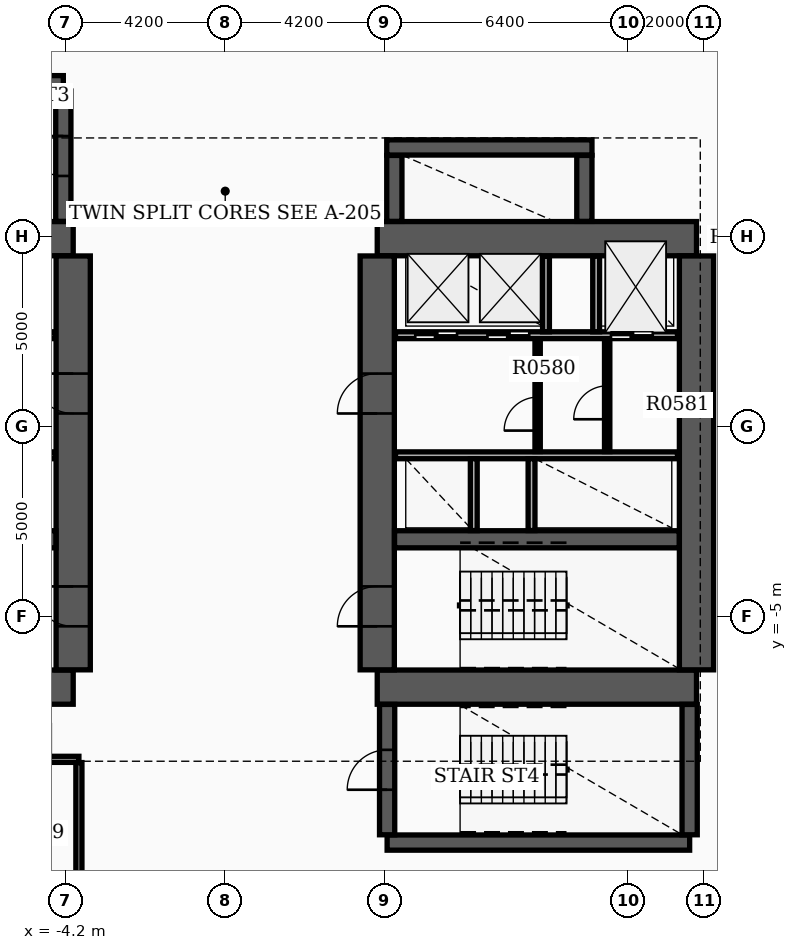
"""IFC4 building model, lengths in metres.
Left out: names, types, materials, properties, quantities, classifications, styles, units other than length and angle.
Written with IfcOpenShell. Run it as: python <this file> out.ifc"""

import sys

from ifc_helpers import new_model, si_unit, direction, frame, frame_2d, origin, place, context, subcontext, project, spatial, rectangle, extrude, element, fill, save


model = new_model("IFC4")
c1 = context("Model", 3, precision=1e-05, world=origin(), true_north=direction((0.0, 1.0)))
c2 = subcontext(c1, "Body", "Model", "MODEL_VIEW")
j1 = project(units=[si_unit("LENGTHUNIT", "METRE"), si_unit("PLANEANGLEUNIT", "RADIAN")], contexts=[c1])
p1 = place(None, origin())
s1 = spatial("IfcSite", under=j1, at=p1, CompositionType="ELEMENT")
p2 = place(p1, origin())
s2 = spatial("IfcBuilding", under=s1, at=p2, CompositionType="ELEMENT")
p3 = place(p2, frame((0.0, 0.0, 39.3)))
s3 = spatial("IfcBuildingStorey", under=s2, at=p3, CompositionType="ELEMENT", Elevation=39.3)
for number, where, z_axis, x_axis in (
    (1, (-12.4, -6.85, 0.0), (0.0, 0.0, 1.0), (1.0, 0.0, 0.0)),
    (2, (-12.4, 4.95, 0.0), (0.0, 0.0, 1.0), (1.0, 0.0, 0.0)),
):
    element("IfcWall", number, at=place(p3, frame(where, z_axis=z_axis, x_axis=x_axis)), inside=s3, PredefinedType="SHEAR", context=c2, shape_type="SweptSolid", body=[
        extrude(rectangle(XDim=8.4, YDim=0.9, at=frame_2d((4.2, 0.0))), origin(), (0.0, 0.0, 1.0), 3.7),
    ])
p4 = place(p3, frame((-4.0, -6.395, 0.0), z_axis=(0.0, 0.0, 1.0), x_axis=(0.0, 1.0, 0.0)))
e3 = element("IfcWall", 3, at=p4, inside=s3, PredefinedType="SHEAR", context=c2, shape_type="SweptSolid", body=[
    extrude(rectangle(XDim=10.89, YDim=0.9, at=frame_2d((5.445, 0.0))), origin(), (0.0, 0.0, 1.0), 3.7),
])
p5 = place(p4, frame((1.145, 0.0, 0.0)))
e4 = element("IfcOpeningElement", 4, at=p5, cuts=e3, PredefinedType="OPENING", context=c2, shape_type="SweptSolid", body=[
    extrude(rectangle(XDim=1.05, YDim=2.15, at=frame_2d((0.525, 1.075))), frame((0.0, 0.46, 0.0), z_axis=(0.0, -1.0, 0.0), x_axis=(1.0, 0.0, 0.0)), (0.0, 0.0, 1.0), 0.92),
])
p6 = place(p4, frame((6.745, 0.0, 0.0)))
e5 = element("IfcOpeningElement", 5, at=p6, cuts=e3, PredefinedType="OPENING", context=c2, shape_type="SweptSolid", body=[
    extrude(rectangle(XDim=1.05, YDim=2.15, at=frame_2d((0.525, 1.075))), frame((0.0, 0.46, 0.0), z_axis=(0.0, -1.0, 0.0), x_axis=(1.0, 0.0, 0.0)), (0.0, 0.0, 1.0), 0.92),
])
p7 = place(p3, frame((-11.945, -2.96, 0.0), z_axis=(0.0, 0.0, 1.0), x_axis=(1.0, 0.0, 0.0)))
e6 = element("IfcWall", 6, at=p7, inside=s3, PredefinedType="SHEAR", context=c2, shape_type="SweptSolid", body=[
    extrude(rectangle(XDim=7.49, YDim=0.45, at=frame_2d((3.745, 0.0))), origin(), (0.0, 0.0, 1.0), 3.7),
])
for number, where, z_axis, x_axis in (
    (7, (4.0, -6.85, 0.0), (0.0, 0.0, 1.0), (1.0, 0.0, 0.0)),
    (8, (4.0, 4.95, 0.0), (0.0, 0.0, 1.0), (1.0, 0.0, 0.0)),
):
    element("IfcWall", number, at=place(p3, frame(where, z_axis=z_axis, x_axis=x_axis)), inside=s3, PredefinedType="SHEAR", context=c2, shape_type="SweptSolid", body=[
        extrude(rectangle(XDim=8.4, YDim=0.9, at=frame_2d((4.2, 0.0))), origin(), (0.0, 0.0, 1.0), 3.7),
    ])
p8 = place(p3, frame((4.0, -6.395, 0.0), z_axis=(0.0, 0.0, 1.0), x_axis=(0.0, 1.0, 0.0)))
e9 = element("IfcWall", 9, at=p8, inside=s3, PredefinedType="SHEAR", context=c2, shape_type="SweptSolid", body=[
    extrude(rectangle(XDim=10.89, YDim=0.9, at=frame_2d((5.445, 0.0))), origin(), (0.0, 0.0, 1.0), 3.7),
])
p9 = place(p8, frame((1.145, 0.0, 0.0)))
e10 = element("IfcOpeningElement", 10, at=p9, cuts=e9, PredefinedType="OPENING", context=c2, shape_type="SweptSolid", body=[
    extrude(rectangle(XDim=1.05, YDim=2.15, at=frame_2d((0.525, 1.075))), frame((0.0, 0.46, 0.0), z_axis=(0.0, -1.0, 0.0), x_axis=(1.0, 0.0, 0.0)), (0.0, 0.0, 1.0), 0.92),
])
p10 = place(p8, frame((6.745, 0.0, 0.0)))
e11 = element("IfcOpeningElement", 11, at=p10, cuts=e9, PredefinedType="OPENING", context=c2, shape_type="SweptSolid", body=[
    extrude(rectangle(XDim=1.05, YDim=2.15, at=frame_2d((0.525, 1.075))), frame((0.0, 0.46, 0.0), z_axis=(0.0, -1.0, 0.0), x_axis=(1.0, 0.0, 0.0)), (0.0, 0.0, 1.0), 0.92),
])
p11 = place(p3, frame((12.4, -6.395, 0.0), z_axis=(0.0, 0.0, 1.0), x_axis=(0.0, 1.0, 0.0)))
e12 = element("IfcWall", 12, at=p11, inside=s3, PredefinedType="SHEAR", context=c2, shape_type="SweptSolid", body=[
    extrude(rectangle(XDim=10.89, YDim=0.9, at=frame_2d((5.445, 0.0))), origin(), (0.0, 0.0, 1.0), 3.7),
])
p12 = place(p3, frame((4.455, -2.96, 0.0), z_axis=(0.0, 0.0, 1.0), x_axis=(1.0, 0.0, 0.0)))
e13 = element("IfcWall", 13, at=p12, inside=s3, PredefinedType="SHEAR", context=c2, shape_type="SweptSolid", body=[
    extrude(rectangle(XDim=7.49, YDim=0.45, at=frame_2d((3.745, 0.0))), origin(), (0.0, 0.0, 1.0), 3.7),
])
p13 = place(p3, frame((-12.22, 9.04, 0.0), z_axis=(0.0, 0.0, 1.0), x_axis=(1.0, 0.0, 0.0)))
e14 = element("IfcWall", 14, at=p13, inside=s3, PredefinedType="SHEAR", context=c2, shape_type="SweptSolid", body=[
    extrude(rectangle(XDim=7.96, YDim=0.4, at=frame_2d((3.98, 0.0))), origin(), (0.0, 0.0, 1.0), 3.7),
])
p14 = place(p3, frame((-4.26, 5.405, 0.0), z_axis=(0.0, 0.0, 1.0), x_axis=(0.0, 1.0, 0.0)))
e15 = element("IfcWall", 15, at=p14, inside=s3, PredefinedType="SHEAR", context=c2, shape_type="SweptSolid", body=[
    extrude(rectangle(XDim=3.43, YDim=0.4, at=frame_2d((1.715, 0.0))), origin(), (0.0, 0.0, 1.0), 3.7),
])
p15 = place(p14, frame((1.195, 0.0, 0.0)))
e16 = element("IfcOpeningElement", 16, at=p15, cuts=e15, PredefinedType="OPENING", context=c2, shape_type="SweptSolid", body=[
    extrude(rectangle(XDim=1.05, YDim=2.15, at=frame_2d((0.525, 1.075))), frame((0.0, 0.21, 0.0), z_axis=(0.0, -1.0, 0.0), x_axis=(1.0, 0.0, 0.0)), (0.0, 0.0, 1.0), 0.42),
])
p16 = place(p3, frame((4.26, -10.94, 0.0), z_axis=(0.0, 0.0, 1.0), x_axis=(1.0, 0.0, 0.0)))
e17 = element("IfcWall", 17, at=p16, inside=s3, PredefinedType="SHEAR", context=c2, shape_type="SweptSolid", body=[
    extrude(rectangle(XDim=7.96, YDim=0.4, at=frame_2d((3.98, 0.0))), origin(), (0.0, 0.0, 1.0), 3.7),
])
p17 = place(p3, frame((4.26, -10.735, 0.0), z_axis=(0.0, 0.0, 1.0), x_axis=(0.0, 1.0, 0.0)))
e18 = element("IfcWall", 18, at=p17, inside=s3, PredefinedType="SHEAR", context=c2, shape_type="SweptSolid", body=[
    extrude(rectangle(XDim=3.43, YDim=0.4, at=frame_2d((1.715, 0.0))), origin(), (0.0, 0.0, 1.0), 3.7),
])
p18 = place(p17, frame((1.185, 0.0, 0.0)))
e19 = element("IfcOpeningElement", 19, at=p18, cuts=e18, PredefinedType="OPENING", context=c2, shape_type="SweptSolid", body=[
    extrude(rectangle(XDim=1.05, YDim=2.15, at=frame_2d((0.525, 1.075))), frame((0.0, 0.21, 0.0), z_axis=(0.0, -1.0, 0.0), x_axis=(1.0, 0.0, 0.0)), (0.0, 0.0, 1.0), 0.42),
])
p19 = place(p3, frame((12.22, -10.735, 0.0), z_axis=(0.0, 0.0, 1.0), x_axis=(0.0, 1.0, 0.0)))
e20 = element("IfcWall", 20, at=p19, inside=s3, PredefinedType="SHEAR", context=c2, shape_type="SweptSolid", body=[
    extrude(rectangle(XDim=3.43, YDim=0.4, at=frame_2d((1.715, 0.0))), origin(), (0.0, 0.0, 1.0), 3.7),
])
p20 = place(p3, frame((4.45, 5.405, 0.0), z_axis=(0.0, 0.0, 1.0), x_axis=(0.0, 1.0, 0.0)))
e21 = element("IfcWall", 21, at=p20, inside=s3, PredefinedType="SHEAR", context=c2, shape_type="SweptSolid", body=[
    extrude(rectangle(XDim=1.735, YDim=0.4, at=frame_2d((0.867, 0.0))), origin(), (0.0, 0.0, 1.0), 3.7),
])
p21 = place(p3, frame((4.25, 7.35, 0.0), z_axis=(0.0, 0.0, 1.0), x_axis=(1.0, 0.0, 0.0)))
e22 = element("IfcWall", 22, at=p21, inside=s3, PredefinedType="SHEAR", context=c2, shape_type="SweptSolid", body=[
    extrude(rectangle(XDim=5.4, YDim=0.4, at=frame_2d((2.7, 0.0))), origin(), (0.0, 0.0, 1.0), 3.7),
])
p22 = place(p3, frame((9.45, 5.405, 0.0), z_axis=(0.0, 0.0, 1.0), x_axis=(0.0, 1.0, 0.0)))
e23 = element("IfcWall", 23, at=p22, inside=s3, PredefinedType="SHEAR", context=c2, shape_type="SweptSolid", body=[
    extrude(rectangle(XDim=1.735, YDim=0.4, at=frame_2d((0.867, 0.0))), origin(), (0.0, 0.0, 1.0), 3.7),
])
p23 = place(p3, frame((-11.9, 2.41, 0.0), z_axis=(0.0, 0.0, 1.0), x_axis=(1.0, 0.0, 0.0)))
e24 = element("IfcWall", 24, at=p23, inside=s3, PredefinedType="SOLIDWALL", context=c2, shape_type="SweptSolid", body=[
    extrude(rectangle(XDim=7.42, YDim=0.18, at=frame_2d((3.71, 0.0))), origin(), (0.0, 0.0, 1.0), 2.9),
])
p24 = place(p23, frame((0.55, 0.0, 0.0)))
e25 = element("IfcOpeningElement", 25, at=p24, cuts=e24, PredefinedType="OPENING", context=c2, shape_type="SweptSolid", body=[
    extrude(rectangle(XDim=1.1, YDim=2.15, at=frame_2d((0.55, 1.075))), frame((0.0, 0.1, 0.0), z_axis=(0.0, -1.0, 0.0), x_axis=(1.0, 0.0, 0.0)), (0.0, 0.0, 1.0), 0.2),
])
p25 = place(p23, frame((3.85, 0.0, 0.0)))
e26 = element("IfcOpeningElement", 26, at=p25, cuts=e24, PredefinedType="OPENING", context=c2, shape_type="SweptSolid", body=[
    extrude(rectangle(XDim=1.1, YDim=2.15, at=frame_2d((0.55, 1.075))), frame((0.0, 0.1, 0.0), z_axis=(0.0, -1.0, 0.0), x_axis=(1.0, 0.0, 0.0)), (0.0, 0.0, 1.0), 0.2),
])
p26 = place(p23, frame((5.75, 0.0, 0.0)))
e27 = element("IfcOpeningElement", 27, at=p26, cuts=e24, PredefinedType="OPENING", context=c2, shape_type="SweptSolid", body=[
    extrude(rectangle(XDim=1.1, YDim=2.15, at=frame_2d((0.55, 1.075))), frame((0.0, 0.1, 0.0), z_axis=(0.0, -1.0, 0.0), x_axis=(1.0, 0.0, 0.0)), (0.0, 0.0, 1.0), 0.2),
])
p27 = place(p3, frame((4.48, 2.41, 0.0), z_axis=(0.0, 0.0, 1.0), x_axis=(1.0, 0.0, 0.0)))
e28 = element("IfcWall", 28, at=p27, inside=s3, PredefinedType="SOLIDWALL", context=c2, shape_type="SweptSolid", body=[
    extrude(rectangle(XDim=7.42, YDim=0.18, at=frame_2d((3.71, 0.0))), origin(), (0.0, 0.0, 1.0), 2.9),
])
p28 = place(p27, frame((5.67, 0.0, 0.0)))
e29 = element("IfcOpeningElement", 29, at=p28, cuts=e28, PredefinedType="OPENING", context=c2, shape_type="SweptSolid", body=[
    extrude(rectangle(XDim=1.1, YDim=2.15, at=frame_2d((0.55, 1.075))), frame((0.0, 0.1, 0.0), z_axis=(0.0, -1.0, 0.0), x_axis=(1.0, 0.0, 0.0)), (0.0, 0.0, 1.0), 0.2),
])
p29 = place(p27, frame((0.52, 0.0, 0.0)))
e30 = element("IfcOpeningElement", 30, at=p29, cuts=e28, PredefinedType="OPENING", context=c2, shape_type="SweptSolid", body=[
    extrude(rectangle(XDim=1.1, YDim=2.15, at=frame_2d((0.55, 1.075))), frame((0.0, 0.1, 0.0), z_axis=(0.0, -1.0, 0.0), x_axis=(1.0, 0.0, 0.0)), (0.0, 0.0, 1.0), 0.2),
])
p30 = place(p27, frame((2.42, 0.0, 0.0)))
e31 = element("IfcOpeningElement", 31, at=p30, cuts=e28, PredefinedType="OPENING", context=c2, shape_type="SweptSolid", body=[
    extrude(rectangle(XDim=1.1, YDim=2.15, at=frame_2d((0.55, 1.075))), frame((0.0, 0.1, 0.0), z_axis=(0.0, -1.0, 0.0), x_axis=(1.0, 0.0, 0.0)), (0.0, 0.0, 1.0), 0.2),
])
for number, where, z_axis, x_axis in (
    (32, (-11.9, -0.75, 0.0), (0.0, 0.0, 1.0), (1.0, 0.0, 0.0)),
    (33, (4.48, -0.75, 0.0), (0.0, 0.0, 1.0), (1.0, 0.0, 0.0)),
):
    element("IfcWall", number, at=place(p3, frame(where, z_axis=z_axis, x_axis=x_axis)), inside=s3, PredefinedType="SOLIDWALL", context=c2, shape_type="SweptSolid", body=[
        extrude(rectangle(XDim=7.42, YDim=0.18, at=frame_2d((3.71, 0.0))), origin(), (0.0, 0.0, 1.0), 2.9),
    ])
for number, where, z_axis, x_axis in (
    (34, (8.44, 2.5, 0.0), (0.0, 0.0, 1.0), (0.0, 1.0, 0.0)),
    (35, (9.76, 2.5, 0.0), (0.0, 0.0, 1.0), (0.0, 1.0, 0.0)),
):
    element("IfcWall", number, at=place(p3, frame(where, z_axis=z_axis, x_axis=x_axis)), inside=s3, PredefinedType="SOLIDWALL", context=c2, shape_type="SweptSolid", body=[
        extrude(rectangle(XDim=1.99, YDim=0.18, at=frame_2d((0.995, 0.0))), origin(), (0.0, 0.0, 1.0), 2.9),
    ])
for number, where, z_axis, x_axis in (
    (36, (6.54, -2.73, 0.0), (0.0, 0.0, 1.0), (0.0, 1.0, 0.0)),
    (37, (8.06, -2.73, 0.0), (0.0, 0.0, 1.0), (0.0, 1.0, 0.0)),
):
    element("IfcWall", number, at=place(p3, frame(where, z_axis=z_axis, x_axis=x_axis)), inside=s3, PredefinedType="SOLIDWALL", context=c2, shape_type="SweptSolid", body=[
        extrude(rectangle(XDim=1.89, YDim=0.18, at=frame_2d((0.945, 0.0))), origin(), (0.0, 0.0, 1.0), 2.9),
    ])
p31 = place(p3, frame((8.22, -0.65, 0.0), z_axis=(0.0, 0.0, 1.0), x_axis=(0.0, 1.0, 0.0)))
e38 = element("IfcWall", 38, at=p31, inside=s3, PredefinedType="SOLIDWALL", context=c2, shape_type="SweptSolid", body=[
    extrude(rectangle(XDim=2.96, YDim=0.14, at=frame_2d((1.48, 0.0))), origin(), (0.0, 0.0, 1.0), 2.9),
])
p32 = place(p31, frame((0.55, 0.0, 0.0)))
e39 = element("IfcOpeningElement", 39, at=p32, cuts=e38, PredefinedType="OPENING", context=c2, shape_type="SweptSolid", body=[
    extrude(rectangle(XDim=0.88, YDim=2.1, at=frame_2d((0.44, 1.05))), frame((0.0, 0.08, 0.0), z_axis=(0.0, -1.0, 0.0), x_axis=(1.0, 0.0, 0.0)), (0.0, 0.0, 1.0), 0.16),
])
p33 = place(p3, frame((10.05, -0.652, 0.0), z_axis=(0.0, 0.0, 1.0), x_axis=(0.0, 1.0, 0.0)))
e40 = element("IfcWall", 40, at=p33, inside=s3, PredefinedType="PARTITIONING", context=c2, shape_type="SweptSolid", body=[
    extrude(rectangle(XDim=2.962, YDim=0.14, at=frame_2d((1.481, 0.0))), origin(), (0.0, 0.0, 1.0), 2.9),
])
p34 = place(p33, frame((0.85, 0.0, 0.0)))
e41 = element("IfcOpeningElement", 41, at=p34, cuts=e40, PredefinedType="OPENING", context=c2, shape_type="SweptSolid", body=[
    extrude(rectangle(XDim=0.88, YDim=2.1, at=frame_2d((0.44, 1.05))), frame((0.0, 0.08, 0.0), z_axis=(0.0, -1.0, 0.0), x_axis=(1.0, 0.0, 0.0)), (0.0, 0.0, 1.0), 0.16),
])
p35 = place(p3, frame((-6.29, -8.75, 0.0), z_axis=(0.0, 0.0, 1.0), x_axis=(1.0, 0.0, 0.0)))
e42 = element("IfcWall", 42, at=p35, inside=s3, PredefinedType="PARTITIONING", context=c2, shape_type="SweptSolid", body=[
    extrude(rectangle(XDim=2.44, YDim=0.16, at=frame_2d((1.22, 0.0))), origin(), (0.0, 0.0, 1.0), 2.9),
])
p36 = place(p35, frame((0.74, 0.0, 0.0)))
e43 = element("IfcOpeningElement", 43, at=p36, cuts=e42, PredefinedType="OPENING", context=c2, shape_type="SweptSolid", body=[
    extrude(rectangle(XDim=0.96, YDim=2.15, at=frame_2d((0.48, 1.075))), frame((0.0, 0.09, 0.0), z_axis=(0.0, -1.0, 0.0), x_axis=(1.0, 0.0, 0.0)), (0.0, 0.0, 1.0), 0.18),
])
p37 = place(p3, frame((-3.85, -13.065, 0.0), z_axis=(0.0, 0.0, 1.0), x_axis=(0.0, 1.0, 0.0)))
e44 = element("IfcWall", 44, at=p37, inside=s3, PredefinedType="PARTITIONING", context=c2, shape_type="SweptSolid", body=[
    extrude(rectangle(XDim=4.23, YDim=0.16, at=frame_2d((2.115, 0.0))), origin(), (0.0, 0.0, 1.0), 2.9),
])
p38 = place(p5, origin())
e45 = element("IfcDoor", 45, at=p38, inside=s3, OperationType="SINGLE_SWING_RIGHT", PredefinedType="DOOR", context=c2, shape_type="SweptSolid", body=[
    extrude(rectangle(XDim=1.05, YDim=2.15, at=frame_2d((0.525, 1.075))), frame((0.0, 0.025, 0.0), z_axis=(0.0, -1.0, 0.0), x_axis=(1.0, 0.0, 0.0)), (0.0, 0.0, 1.0), 0.05),
])
fill(e4, e45)
p39 = place(p9, origin())
e46 = element("IfcDoor", 46, at=p39, inside=s3, OperationType="SINGLE_SWING_LEFT", PredefinedType="DOOR", context=c2, shape_type="SweptSolid", body=[
    extrude(rectangle(XDim=1.05, YDim=2.15, at=frame_2d((0.525, 1.075))), frame((0.0, 0.025, 0.0), z_axis=(0.0, -1.0, 0.0), x_axis=(1.0, 0.0, 0.0)), (0.0, 0.0, 1.0), 0.05),
])
fill(e10, e46)
p40 = place(p6, origin())
e47 = element("IfcDoor", 47, at=p40, inside=s3, OperationType="SINGLE_SWING_RIGHT", PredefinedType="DOOR", context=c2, shape_type="SweptSolid", body=[
    extrude(rectangle(XDim=1.05, YDim=2.15, at=frame_2d((0.525, 1.075))), frame((0.0, 0.025, 0.0), z_axis=(0.0, -1.0, 0.0), x_axis=(1.0, 0.0, 0.0)), (0.0, 0.0, 1.0), 0.05),
])
fill(e5, e47)
p41 = place(p10, origin())
e48 = element("IfcDoor", 48, at=p41, inside=s3, OperationType="SINGLE_SWING_LEFT", PredefinedType="DOOR", context=c2, shape_type="SweptSolid", body=[
    extrude(rectangle(XDim=1.05, YDim=2.15, at=frame_2d((0.525, 1.075))), frame((0.0, 0.025, 0.0), z_axis=(0.0, -1.0, 0.0), x_axis=(1.0, 0.0, 0.0)), (0.0, 0.0, 1.0), 0.05),
])
fill(e11, e48)
p42 = place(p15, origin())
e49 = element("IfcDoor", 49, at=p42, inside=s3, OperationType="SINGLE_SWING_RIGHT", PredefinedType="DOOR", context=c2, shape_type="SweptSolid", body=[
    extrude(rectangle(XDim=1.05, YDim=2.15, at=frame_2d((0.525, 1.075))), frame((0.0, 0.025, 0.0), z_axis=(0.0, -1.0, 0.0), x_axis=(1.0, 0.0, 0.0)), (0.0, 0.0, 1.0), 0.05),
])
fill(e16, e49)
p43 = place(p18, origin())
e50 = element("IfcDoor", 50, at=p43, inside=s3, OperationType="SINGLE_SWING_LEFT", PredefinedType="DOOR", context=c2, shape_type="SweptSolid", body=[
    extrude(rectangle(XDim=1.05, YDim=2.15, at=frame_2d((0.525, 1.075))), frame((0.0, 0.025, 0.0), z_axis=(0.0, -1.0, 0.0), x_axis=(1.0, 0.0, 0.0)), (0.0, 0.0, 1.0), 0.05),
])
fill(e19, e50)
p44 = place(p28, origin())
e51 = element("IfcDoor", 51, at=p44, inside=s3, OperationType="DOUBLE_DOOR_SLIDING", PredefinedType="DOOR", context=c2, shape_type="SweptSolid", body=[
    extrude(rectangle(XDim=1.1, YDim=2.15, at=frame_2d((0.55, 1.075))), frame((0.0, 0.025, 0.0), z_axis=(0.0, -1.0, 0.0), x_axis=(1.0, 0.0, 0.0)), (0.0, 0.0, 1.0), 0.05),
])
fill(e29, e51)
p45 = place(p29, origin())
e52 = element("IfcDoor", 52, at=p45, inside=s3, OperationType="DOUBLE_DOOR_SLIDING", PredefinedType="DOOR", context=c2, shape_type="SweptSolid", body=[
    extrude(rectangle(XDim=1.1, YDim=2.15, at=frame_2d((0.55, 1.075))), frame((0.0, 0.025, 0.0), z_axis=(0.0, -1.0, 0.0), x_axis=(1.0, 0.0, 0.0)), (0.0, 0.0, 1.0), 0.05),
])
fill(e30, e52)
p46 = place(p30, origin())
e53 = element("IfcDoor", 53, at=p46, inside=s3, OperationType="DOUBLE_DOOR_SLIDING", PredefinedType="DOOR", context=c2, shape_type="SweptSolid", body=[
    extrude(rectangle(XDim=1.1, YDim=2.15, at=frame_2d((0.55, 1.075))), frame((0.0, 0.025, 0.0), z_axis=(0.0, -1.0, 0.0), x_axis=(1.0, 0.0, 0.0)), (0.0, 0.0, 1.0), 0.05),
])
fill(e31, e53)
p47 = place(p32, origin())
e54 = element("IfcDoor", 54, at=p47, inside=s3, OperationType="SINGLE_SWING_LEFT", PredefinedType="DOOR", context=c2, shape_type="SweptSolid", body=[
    extrude(rectangle(XDim=0.88, YDim=2.1, at=frame_2d((0.44, 1.05))), frame((0.0, 0.025, 0.0), z_axis=(0.0, -1.0, 0.0), x_axis=(1.0, 0.0, 0.0)), (0.0, 0.0, 1.0), 0.05),
])
fill(e39, e54)
p48 = place(p34, origin())
e55 = element("IfcDoor", 55, at=p48, inside=s3, OperationType="SINGLE_SWING_LEFT", PredefinedType="DOOR", context=c2, shape_type="SweptSolid", body=[
    extrude(rectangle(XDim=0.88, YDim=2.1, at=frame_2d((0.44, 1.05))), frame((0.0, 0.025, 0.0), z_axis=(0.0, -1.0, 0.0), x_axis=(1.0, 0.0, 0.0)), (0.0, 0.0, 1.0), 0.05),
])
fill(e41, e55)
save(model, sys.argv[1])
